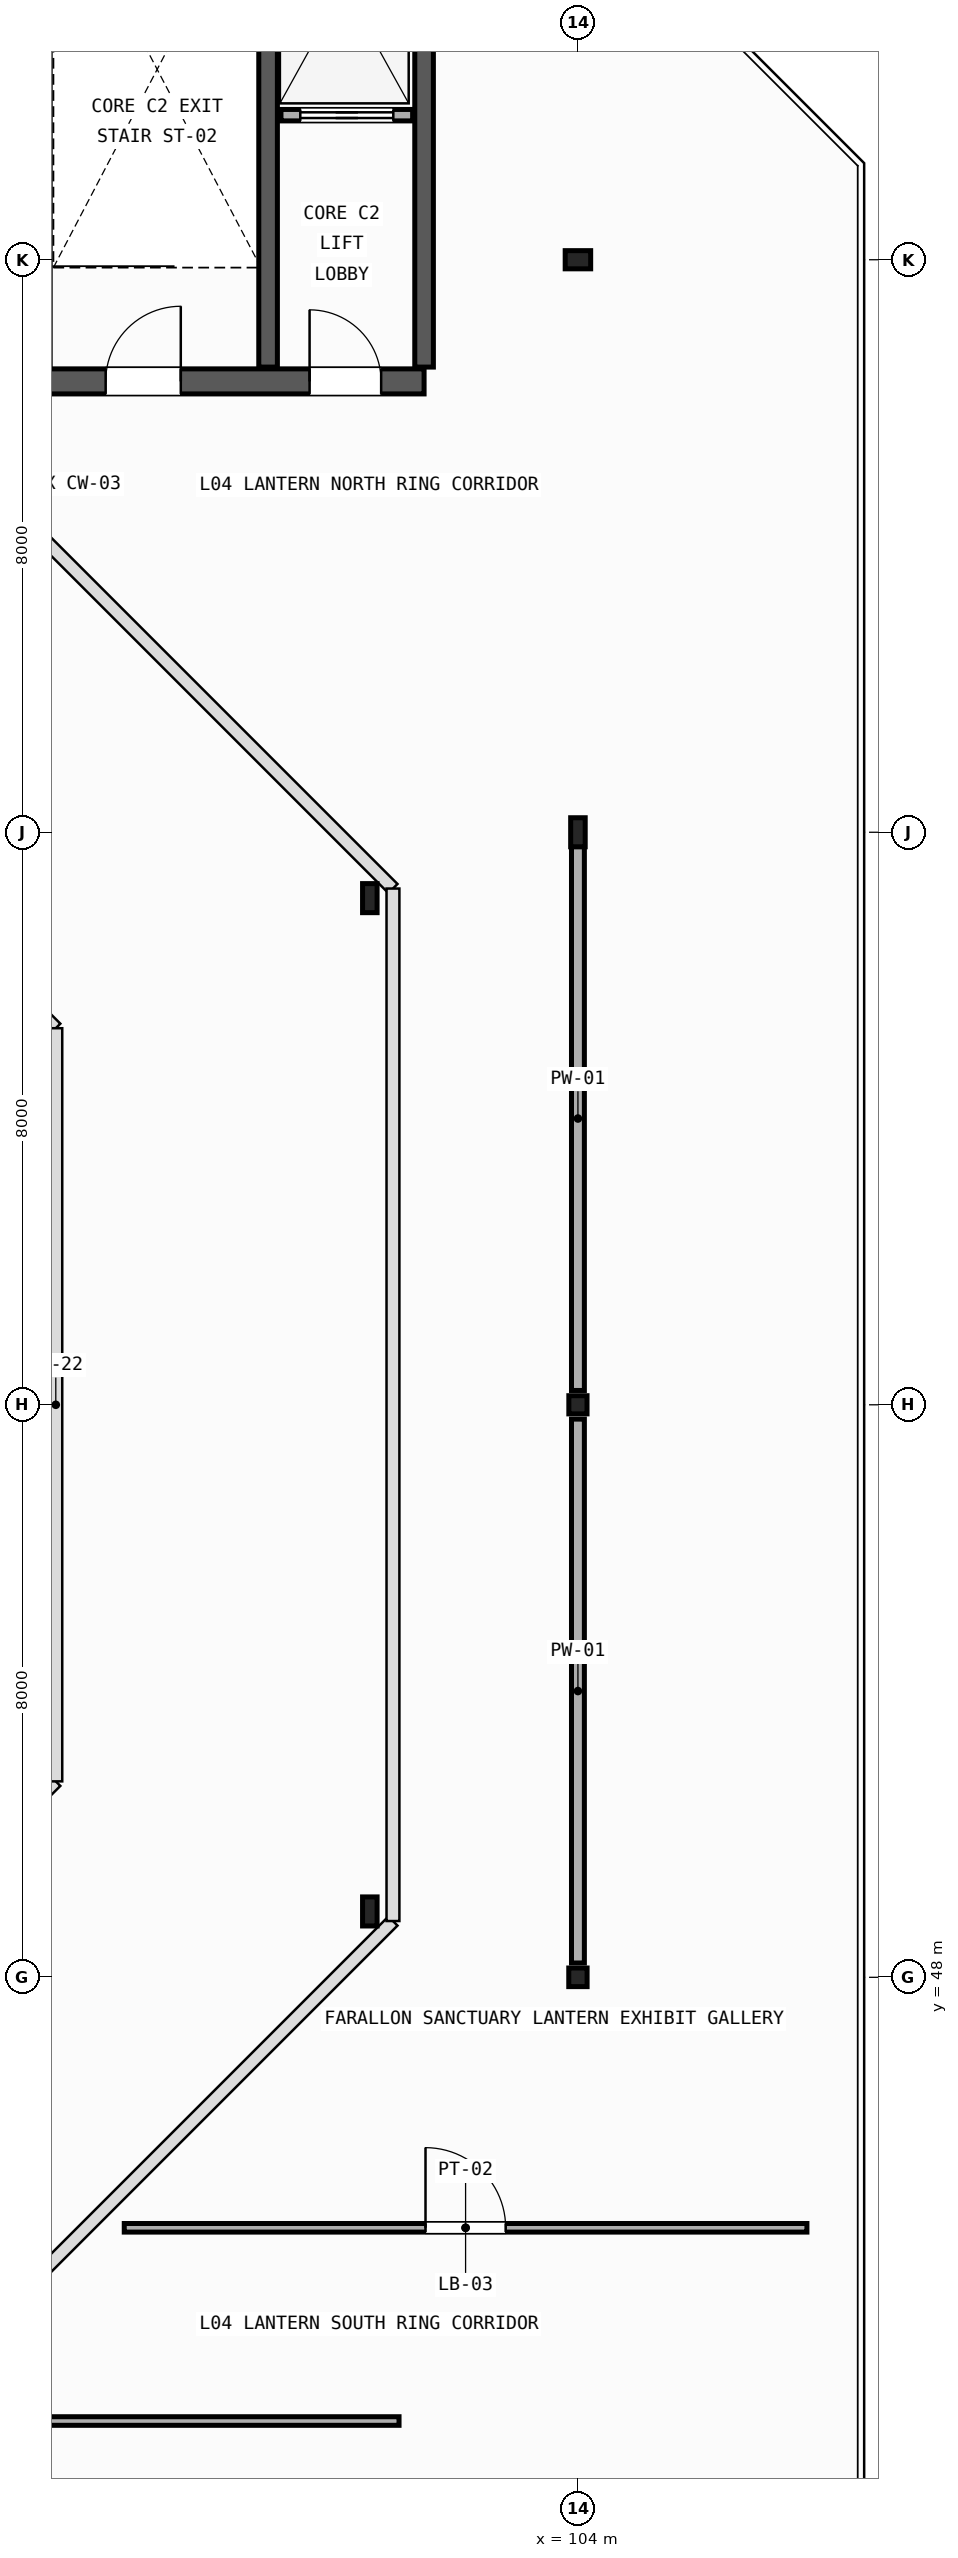
"""IFC4 building model, lengths in metres.
Left out: names, types, materials, properties, quantities, classifications, styles, units other than length and angle.
Written with IfcOpenShell. Run it as: python <this file> out.ifc"""

import sys

from ifc_helpers import new_model, si_unit, direction, frame, frame_2d, origin, origin_2d, place, context, subcontext, project, spatial, rectangle, hollow_rectangle, i_section, extrude, element, fill, save


model = new_model("IFC4")
c1 = context("Model", 3, precision=1e-05, world=origin(), true_north=direction((0.0, 1.0)))
c2 = subcontext(c1, "Body", "Model", "MODEL_VIEW")
j1 = project(units=[si_unit("LENGTHUNIT", "METRE"), si_unit("PLANEANGLEUNIT", "RADIAN")], contexts=[c1])
p1 = place(None, origin())
s1 = spatial("IfcSite", under=j1, at=p1, CompositionType="ELEMENT")
p2 = place(p1, origin())
s2 = spatial("IfcBuilding", under=s1, at=p2, CompositionType="ELEMENT")
p3 = place(p2, frame((0.0, 0.0, 19.8)))
s3 = spatial("IfcBuildingStorey", under=s2, at=p3, CompositionType="ELEMENT", Elevation=19.8)
p4 = place(p3, frame((104.0, 48.0, 0.0), z_axis=(0.0, 0.0, 1.0), x_axis=(1.0, 0.0, 0.0)))
e1 = element("IfcColumn", 1, at=p4, inside=s3, PredefinedType="COLUMN", context=c2, shape_type="SweptSolid", body=[
    extrude(i_section(OverallWidth=0.256, OverallDepth=0.26, WebThickness=0.011, FlangeThickness=0.017, FilletRadius=0.011, at=origin_2d()), origin(), (0.0, 0.0, 1.0), 5.245),
])
p5 = place(p3, frame((104.0, 56.0, 0.0), z_axis=(0.0, 0.0, 1.0), x_axis=(0.0, 1.0, 0.0)))
e2 = element("IfcColumn", 2, at=p5, inside=s3, PredefinedType="COLUMN", context=c2, shape_type="SweptSolid", body=[
    extrude(i_section(OverallWidth=0.254, OverallDepth=0.254, WebThickness=0.009, FlangeThickness=0.014, FilletRadius=0.011, at=origin_2d()), origin(), (0.0, 0.0, 1.0), 5.245),
])
p6 = place(p3, frame((104.0, 64.0, 0.0), z_axis=(0.0, 0.0, 1.0), x_axis=(1.0, 0.0, 0.0)))
e3 = element("IfcColumn", 3, at=p6, inside=s3, PredefinedType="COLUMN", context=c2, shape_type="SweptSolid", body=[
    extrude(hollow_rectangle(XDim=0.203, YDim=0.406, WallThickness=0.012, InnerFilletRadius=0.012, OuterFilletRadius=0.024, at=origin_2d()), origin(), (0.0, 0.0, 1.0), 5.245),
])
p7 = place(p3, frame((104.0, 72.0, 0.0), z_axis=(0.0, 0.0, 1.0), x_axis=(0.0, 1.0, 0.0)))
e4 = element("IfcColumn", 4, at=p7, inside=s3, PredefinedType="COLUMN", context=c2, shape_type="SweptSolid", body=[
    extrude(hollow_rectangle(XDim=0.254, YDim=0.356, WallThickness=0.012, InnerFilletRadius=0.012, OuterFilletRadius=0.024, at=origin_2d()), origin(), (0.0, 0.0, 1.0), 5.637),
])
for number, where, z_axis, x_axis in (
    (5, (101.092, 63.08, 0.0), (0.0, 0.0, 1.0), (1.0, 0.0, 0.0)),
    (6, (101.092, 48.92, 0.0), (0.0, 0.0, 1.0), (1.0, 0.0, 0.0)),
):
    element("IfcColumn", number, at=place(p3, frame(where, z_axis=z_axis, x_axis=x_axis)), inside=s3, PredefinedType="COLUMN", context=c2, shape_type="SweptSolid", body=[
        extrude(hollow_rectangle(XDim=0.203, YDim=0.406, WallThickness=0.012, InnerFilletRadius=0.012, OuterFilletRadius=0.024, at=origin_2d()), origin(), (0.0, 0.0, 1.0), 5.72),
    ])
for number, where, z_axis, x_axis in (
    (7, (104.0, 48.2, 4.45), (0.0, 0.0, 1.0), (0.0, 1.0, 0.0)),
    (8, (104.0, 56.2, 4.45), (0.0, 0.0, 1.0), (0.0, 1.0, 0.0)),
):
    element("IfcWall", number, at=place(p3, frame(where, z_axis=z_axis, x_axis=x_axis)), inside=s3, PredefinedType="PARAPET", context=c2, shape_type="SweptSolid", body=[
        extrude(rectangle(XDim=7.6, YDim=0.18, at=frame_2d((3.8, 0.0))), origin(), (0.0, 0.0, 1.0), 1.25),
    ])
p8 = place(p3, frame((96.45, 70.3, 0.0), z_axis=(0.0, 0.0, 1.0), x_axis=(1.0, 0.0, 0.0)))
e9 = element("IfcWall", 9, at=p8, inside=s3, PredefinedType="SHEAR", context=c2, shape_type="SweptSolid", body=[
    extrude(rectangle(XDim=5.4, YDim=0.35, at=frame_2d((2.7, 0.0))), origin(), (0.0, 0.0, 1.0), 4.3),
])
p9 = place(p8, frame((0.95, 0.0, 0.0)))
e10 = element("IfcOpeningElement", 10, at=p9, cuts=e9, PredefinedType="OPENING", context=c2, shape_type="SweptSolid", body=[
    extrude(rectangle(XDim=1.05, YDim=2.1, at=frame_2d((0.525, 1.05))), frame((0.0, 0.185, 0.0), z_axis=(0.0, -1.0, 0.0), x_axis=(1.0, 0.0, 0.0)), (0.0, 0.0, 1.0), 0.37),
])
p10 = place(p8, frame((3.8, 0.0, 0.0)))
e11 = element("IfcOpeningElement", 11, at=p10, cuts=e9, PredefinedType="OPENING", context=c2, shape_type="SweptSolid", body=[
    extrude(rectangle(XDim=1.0, YDim=2.15, at=frame_2d((0.5, 1.075))), frame((0.0, 0.185, 0.0), z_axis=(0.0, -1.0, 0.0), x_axis=(1.0, 0.0, 0.0)), (0.0, 0.0, 1.0), 0.37),
])
for number, where, z_axis, x_axis in (
    (12, (101.85, 70.5, 0.0), (0.0, 0.0, 1.0), (0.0, 1.0, 0.0)),
    (13, (99.67, 70.5, 0.0), (0.0, 0.0, 1.0), (0.0, 1.0, 0.0)),
):
    element("IfcWall", number, at=place(p3, frame(where, z_axis=z_axis, x_axis=x_axis)), inside=s3, PredefinedType="SHEAR", context=c2, shape_type="SweptSolid", body=[
        extrude(rectangle(XDim=6.95, YDim=0.26, at=frame_2d((3.475, 0.0))), origin(), (0.0, 0.0, 1.0), 4.3),
    ])
p11 = place(p3, frame((99.85, 74.02, 0.0), z_axis=(0.0, 0.0, 1.0), x_axis=(1.0, 0.0, 0.0)))
e14 = element("IfcWall", 14, at=p11, inside=s3, PredefinedType="PARTITIONING", context=c2, shape_type="SweptSolid", body=[
    extrude(rectangle(XDim=1.84, YDim=0.16, at=frame_2d((0.92, 0.0))), origin(), (0.0, 0.0, 1.0), 3.6),
])
p12 = place(p11, frame((0.27, 0.0, 0.0)))
e15 = element("IfcOpeningElement", 15, at=p12, cuts=e14, PredefinedType="OPENING", context=c2, shape_type="SweptSolid", body=[
    extrude(rectangle(XDim=1.3, YDim=2.2, at=frame_2d((0.65, 1.1))), frame((0.0, 0.09, 0.0), z_axis=(0.0, -1.0, 0.0), x_axis=(1.0, 0.0, 0.0)), (0.0, 0.0, 1.0), 0.18),
])
p13 = place(p3, frame((76.0, 41.8, 0.0), z_axis=(0.0, 0.0, 1.0), x_axis=(1.0, 0.0, 0.0)))
e16 = element("IfcWall", 16, at=p13, inside=s3, PredefinedType="PARTITIONING", context=c2, shape_type="SweptSolid", body=[
    extrude(rectangle(XDim=25.5, YDim=0.12, at=frame_2d((12.75, 0.0))), origin(), (0.0, 0.0, 1.0), 4.157),
])
p14 = place(p13, frame((7.843, 0.0, 0.0)))
e17 = element("IfcOpeningElement", 17, at=p14, cuts=e16, PredefinedType="OPENING", context=c2, shape_type="SweptSolid", body=[
    extrude(rectangle(XDim=1.35, YDim=2.25, at=frame_2d((0.675, 1.125))), frame((0.0, 0.07, 0.0), z_axis=(0.0, -1.0, 0.0), x_axis=(1.0, 0.0, 0.0)), (0.0, 0.0, 1.0), 0.14),
])
p15 = place(p3, frame((97.66, 44.5, 0.0), z_axis=(0.0, 0.0, 1.0), x_axis=(1.0, 0.0, 0.0)))
e18 = element("IfcWall", 18, at=p15, inside=s3, PredefinedType="PARTITIONING", context=c2, shape_type="SweptSolid", body=[
    extrude(rectangle(XDim=9.54, YDim=0.12, at=frame_2d((4.77, 0.0))), origin(), (0.0, 0.0, 1.0), 4.157),
])
p16 = place(p15, frame((4.21, 0.0, 0.0)))
e19 = element("IfcOpeningElement", 19, at=p16, cuts=e18, PredefinedType="OPENING", context=c2, shape_type="SweptSolid", body=[
    extrude(rectangle(XDim=1.12, YDim=2.15, at=frame_2d((0.56, 1.075))), frame((0.0, 0.07, 0.0), z_axis=(0.0, -1.0, 0.0), x_axis=(1.0, 0.0, 0.0)), (0.0, 0.0, 1.0), 0.14),
])
p17 = place(p12, origin())
e20 = element("IfcDoor", 20, at=p17, inside=s3, OperationType="SLIDING_TO_LEFT", PredefinedType="DOOR", context=c2, shape_type="SweptSolid", body=[
    extrude(rectangle(XDim=1.3, YDim=2.2, at=frame_2d((0.65, 1.1))), frame((0.0, 0.025, 0.0), z_axis=(0.0, -1.0, 0.0), x_axis=(1.0, 0.0, 0.0)), (0.0, 0.0, 1.0), 0.05),
])
fill(e15, e20)
p18 = place(p9, origin())
e21 = element("IfcDoor", 21, at=p18, inside=s3, OperationType="SINGLE_SWING_RIGHT", PredefinedType="DOOR", context=c2, shape_type="SweptSolid", body=[
    extrude(rectangle(XDim=1.05, YDim=2.1, at=frame_2d((0.525, 1.05))), frame((0.0, 0.025, 0.0), z_axis=(0.0, -1.0, 0.0), x_axis=(1.0, 0.0, 0.0)), (0.0, 0.0, 1.0), 0.05),
])
fill(e10, e21)
p19 = place(p10, origin())
e22 = element("IfcDoor", 22, at=p19, inside=s3, OperationType="SINGLE_SWING_LEFT", PredefinedType="DOOR", context=c2, shape_type="SweptSolid", body=[
    extrude(rectangle(XDim=1.0, YDim=2.15, at=frame_2d((0.5, 1.075))), frame((0.0, 0.025, 0.0), z_axis=(0.0, -1.0, 0.0), x_axis=(1.0, 0.0, 0.0)), (0.0, 0.0, 1.0), 0.05),
])
fill(e11, e22)
p20 = place(p16, origin())
e23 = element("IfcDoor", 23, at=p20, inside=s3, OperationType="SINGLE_SWING_LEFT", PredefinedType="DOOR", context=c2, shape_type="SweptSolid", body=[
    extrude(rectangle(XDim=1.12, YDim=2.15, at=frame_2d((0.56, 1.075))), frame((0.0, 0.025, 0.0), z_axis=(0.0, -1.0, 0.0), x_axis=(1.0, 0.0, 0.0)), (0.0, 0.0, 1.0), 0.05),
])
fill(e19, e23)
save(model, sys.argv[1])
